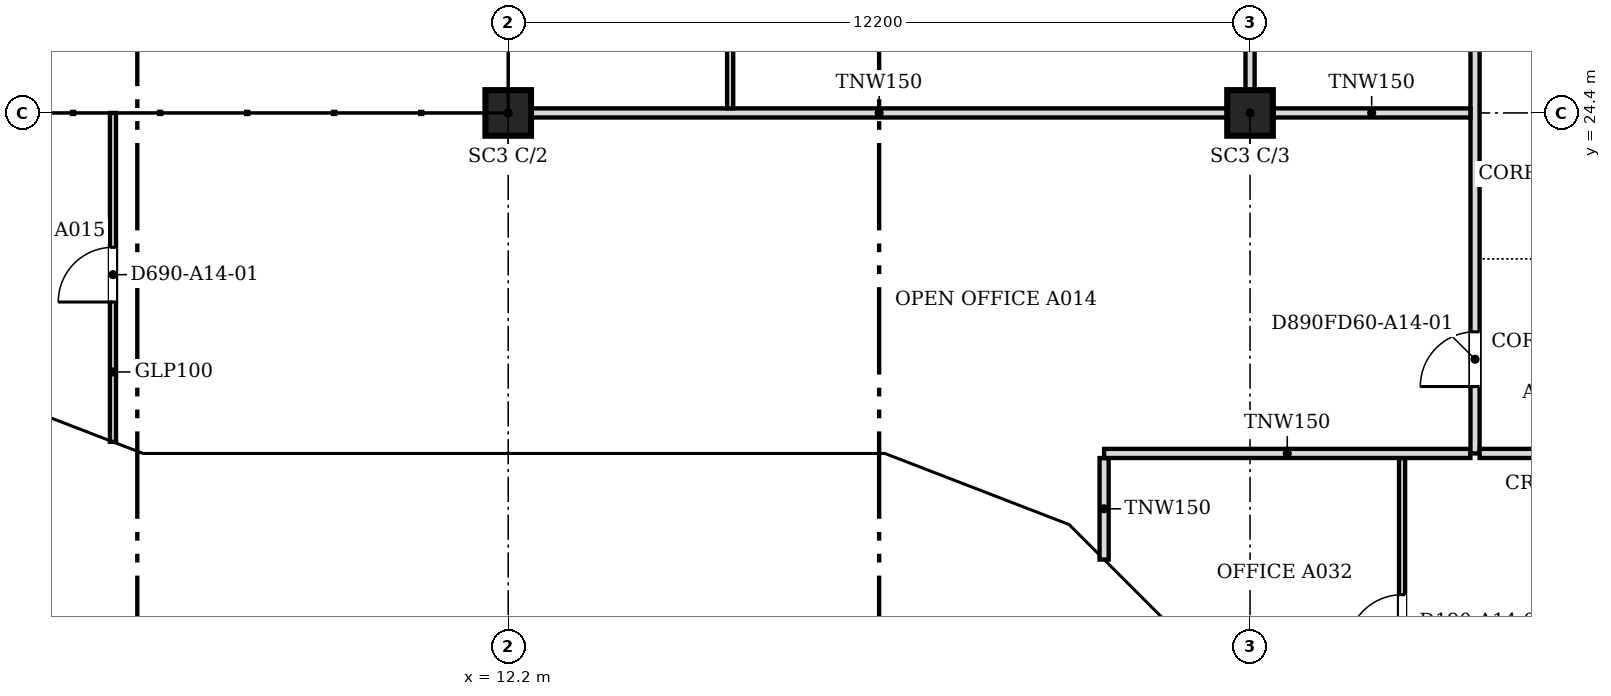
"""IFC4 building model, lengths in metres.
Left out: names, types, materials, properties, quantities, classifications, styles, units other than length and angle.
Written with IfcOpenShell. Run it as: python <this file> out.ifc"""

import sys

from ifc_helpers import new_model, si_unit, direction, frame, frame_2d, origin, origin_2d, place, context, subcontext, project, spatial, polyline, rectangle, outline, extrude, faceted_brep, source, transform, mapped, element, fill, save


model = new_model("IFC4")
c1 = context("Model", 3, precision=1e-05, world=origin(), true_north=direction((0.0, 1.0)))
c2 = subcontext(c1, "Body", "Model", "MODEL_VIEW")
j1 = project(units=[si_unit("LENGTHUNIT", "METRE"), si_unit("PLANEANGLEUNIT", "RADIAN")], contexts=[c1])
p1 = place(None, origin())
s1 = spatial("IfcSite", under=j1, at=p1, CompositionType="ELEMENT")
p2 = place(p1, origin())
s2 = spatial("IfcBuilding", under=s1, at=p2, CompositionType="ELEMENT")
p3 = place(p2, frame((0.0, 0.0, 159.2)))
s3 = spatial("IfcBuildingStorey", under=s2, at=p3, CompositionType="ELEMENT", Elevation=159.2)
for number, where, z_axis, x_axis in (
    (1, (12.2, 24.4, 0.0), (0.0, 0.0, 1.0), (1.0, 0.0, 0.0)),
    (2, (24.4, 24.4, 0.0), (0.0, 0.0, 1.0), (1.0, 0.0, 0.0)),
):
    element("IfcColumn", number, at=place(p3, frame(where, z_axis=z_axis, x_axis=x_axis)), inside=s3, PredefinedType="COLUMN", context=c2, shape_type="SweptSolid", body=[
        extrude(rectangle(XDim=0.75, YDim=0.75, at=origin_2d()), origin(), (0.0, 0.0, 1.0), 3.6),
    ])
m1 = source(origin(), c2, "Body", "Brep", [
    faceted_brep([(0.053, -0.25, 0.0), (3.003, -0.25, 3.8), (0.053, -0.25, 7.6), (0.0, -0.25, 7.532), (0.0, -0.25, 0.068), (0.106, 0.25, 7.532), (2.957, 0.25, 3.86), (2.957, 0.25, 3.74), (0.106, 0.25, 0.068), (3.003, 0.0, 3.8), (0.053, 0.0, 0.0), (0.053, 0.0, 7.6)], [[[0, 1, 2, 3, 4]], [[5, 6, 7, 8]], [[8, 7, 9, 1, 0, 10]], [[6, 5, 11, 2, 1, 9]], [[3, 2, 11]], [[10, 0, 4]], [[8, 10, 4, 3, 11, 5]], [[9, 7, 6]]]),
])
p4 = place(p3, frame((3.344, 19.631, -3.8), z_axis=(0.0, 0.0, 1.0), x_axis=(0.933007896601, -0.359855894603, 0.0)))
e3 = element("IfcWall", 3, at=p4, inside=s3, PredefinedType="SOLIDWALL", context=c2, shape_type="MappedRepresentation", body=[
    mapped(m1, transform((0.0, 0.0, 0.0), scale=1.0)),
])
m2 = source(origin(), c2, "Body", "SweptSolid", [
    extrude(outline(polyline([(0.253, 0.665), (2.687, 3.8), (0.253, 6.935), (0.253, 0.665)])), frame((0.0, 0.26, 0.0), z_axis=(0.0, -1.0, 0.0), x_axis=(1.0, 0.0, 0.0)), (0.0, 0.0, 1.0), 0.52),
])
p5 = place(p4, origin())
e4 = element("IfcOpeningElement", 4, at=p5, cuts=e3, PredefinedType="OPENING", context=c2, shape_type="MappedRepresentation", body=[
    mapped(m2, transform((0.0, 0.0, 0.0), scale=1.0)),
])
m3 = source(origin(), c2, "Body", "Brep", [
    faceted_brep([(3.003, -0.25, 0.0), (6.053, -0.25, 3.8), (3.003, -0.25, 7.6), (0.0, -0.25, 3.8), (0.047, 0.25, 3.859), (3.003, 0.25, 7.6), (6.053, 0.25, 3.8), (3.003, 0.25, 0.0), (0.047, 0.25, 3.741), (0.0, 0.0, 3.8)], [[[0, 1, 2, 3]], [[4, 5, 6, 7, 8]], [[7, 6, 1, 0]], [[6, 5, 2, 1]], [[5, 4, 9, 3, 2]], [[8, 7, 0, 3, 9]], [[8, 9, 4]]]),
])
p6 = place(p3, frame((6.146, 18.55, -3.8), z_axis=(0.0, 0.0, 1.0), x_axis=(1.0, 0.0, 0.0)))
e5 = element("IfcWall", 5, at=p6, inside=s3, PredefinedType="SOLIDWALL", context=c2, shape_type="MappedRepresentation", body=[
    mapped(m3, transform((0.0, 0.0, 0.0), scale=1.0)),
])
m4 = source(origin(), c2, "Body", "SweptSolid", [
    extrude(outline(polyline([(3.005, 0.401), (5.733, 3.8), (3.005, 7.199), (0.319, 3.8), (3.005, 0.401)])), frame((0.0, 0.26, 0.0), z_axis=(0.0, -1.0, 0.0), x_axis=(1.0, 0.0, 0.0)), (0.0, 0.0, 1.0), 0.52),
])
p7 = place(p6, origin())
e6 = element("IfcOpeningElement", 6, at=p7, cuts=e5, PredefinedType="OPENING", context=c2, shape_type="MappedRepresentation", body=[
    mapped(m4, transform((0.0, 0.0, 0.0), scale=1.0)),
])
m5 = source(origin(), c2, "Body", "Brep", [
    faceted_brep([(3.05, -0.25, 0.0), (6.1, -0.25, 3.743), (6.1, -0.25, 3.857), (3.05, -0.25, 7.6), (0.0, -0.25, 3.8), (0.0, 0.25, 3.8), (3.05, 0.25, 7.6), (6.146, 0.25, 3.8), (3.05, 0.25, 0.0), (6.146, -0.0, 3.8)], [[[0, 1, 2, 3, 4]], [[5, 6, 7, 8]], [[8, 7, 9, 1, 0]], [[7, 6, 3, 2, 9]], [[6, 5, 4, 3]], [[5, 8, 0, 4]], [[1, 9, 2]]]),
])
p8 = place(p3, frame((12.2, 18.55, -3.8), z_axis=(0.0, 0.0, 1.0), x_axis=(1.0, 0.0, 0.0)))
e7 = element("IfcWall", 7, at=p8, inside=s3, PredefinedType="SOLIDWALL", context=c2, shape_type="MappedRepresentation", body=[
    mapped(m5, transform((0.0, 0.0, 0.0), scale=1.0)),
])
m6 = source(origin(), c2, "Body", "SweptSolid", [
    extrude(outline(polyline([(3.052, 0.398), (5.824, 3.8), (3.052, 7.203), (0.321, 3.8), (3.052, 0.398)])), frame((0.0, 0.26, 0.0), z_axis=(0.0, -1.0, 0.0), x_axis=(1.0, 0.0, 0.0)), (0.0, 0.0, 1.0), 0.52),
])
p9 = place(p8, origin())
e8 = element("IfcOpeningElement", 8, at=p9, cuts=e7, PredefinedType="OPENING", context=c2, shape_type="MappedRepresentation", body=[
    mapped(m6, transform((0.0, 0.0, 0.0), scale=1.0)),
])
m7 = source(origin(), c2, "Body", "Brep", [
    faceted_brep([(3.096, -0.25, 7.536), (0.047, -0.25, 3.856), (0.047, -0.25, 3.744), (3.096, -0.25, 0.064), (0.0, 0.25, 3.8), (3.149, 0.25, 7.6), (3.202, 0.25, 7.536), (3.202, 0.25, 0.064), (3.149, 0.25, 0.0), (3.149, -0.0, 0.0), (3.149, -0.0, 7.6), (0.0, 0.0, 3.8)], [[[0, 1, 2, 3]], [[4, 5, 6, 7, 8]], [[8, 7, 9]], [[6, 5, 10]], [[5, 4, 11, 1, 0, 10]], [[4, 8, 9, 3, 2, 11]], [[11, 2, 1]], [[3, 9, 7, 6, 10, 0]]]),
])
p10 = place(p3, frame((18.346, 18.55, -3.8), z_axis=(0.0, 0.0, 1.0), x_axis=(0.932985567668, -0.359913782069, 0.0)))
e9 = element("IfcWall", 9, at=p10, inside=s3, PredefinedType="SOLIDWALL", context=c2, shape_type="MappedRepresentation", body=[
    mapped(m7, transform((0.0, 0.0, 0.0), scale=1.0)),
])
m8 = source(origin(), c2, "Body", "SweptSolid", [
    extrude(outline(polyline([(2.949, 6.967), (0.325, 3.8), (2.949, 0.633), (2.949, 6.967)])), frame((0.0, 0.26, 0.0), z_axis=(0.0, -1.0, 0.0), x_axis=(1.0, 0.0, 0.0)), (0.0, 0.0, 1.0), 0.52),
])
p11 = place(p10, origin())
e10 = element("IfcOpeningElement", 10, at=p11, cuts=e9, PredefinedType="OPENING", context=c2, shape_type="MappedRepresentation", body=[
    mapped(m8, transform((0.0, 0.0, 0.0), scale=1.0)),
])
m9 = source(origin(), c2, "Body", "Brep", [
    faceted_brep([(0.106, -0.25, 0.064), (3.156, -0.25, 3.736), (3.156, -0.25, 3.864), (0.106, -0.25, 7.536), (0.0, 0.25, 7.536), (0.053, 0.25, 7.6), (3.209, 0.25, 3.8), (0.053, 0.25, 0.0), (0.0, 0.25, 0.064), (3.209, -0.0, 3.8), (0.053, 0.0, 0.0), (0.053, 0.0, 7.6)], [[[0, 1, 2, 3]], [[4, 5, 6, 7, 8]], [[7, 6, 9, 1, 0, 10]], [[6, 5, 11, 3, 2, 9]], [[5, 4, 11]], [[8, 7, 10]], [[8, 10, 0, 3, 11, 4]], [[1, 9, 2]]]),
])
p12 = place(p3, frame((21.248, 17.454, -3.8), z_axis=(0.0, 0.0, 1.0), x_axis=(0.707106781187, -0.707106781187, 0.0)))
e11 = element("IfcWall", 11, at=p12, inside=s3, PredefinedType="SOLIDWALL", context=c2, shape_type="MappedRepresentation", body=[
    mapped(m9, transform((0.0, 0.0, 0.0), scale=1.0)),
])
m10 = source(origin(), c2, "Body", "SweptSolid", [
    extrude(outline(polyline([(0.253, 0.632), (2.884, 3.8), (0.253, 6.968), (0.253, 0.632)])), frame((0.0, 0.26, 0.0), z_axis=(0.0, -1.0, 0.0), x_axis=(1.0, 0.0, 0.0)), (0.0, 0.0, 1.0), 0.52),
])
p13 = place(p12, origin())
e12 = element("IfcOpeningElement", 12, at=p13, cuts=e11, PredefinedType="OPENING", context=c2, shape_type="MappedRepresentation", body=[
    mapped(m10, transform((0.0, 0.0, 0.0), scale=1.0)),
])
p14 = place(p2, frame((0.0, 0.0, 163.0)))
s4 = spatial("IfcBuildingStorey", under=s2, at=p14, CompositionType="ELEMENT", Elevation=163.0)
m11 = source(origin(), c2, "Body", "Brep", [
    faceted_brep([(2.95, -0.25, 0.0), (2.997, -0.25, 0.059), (2.997, -0.25, 7.541), (2.95, -0.25, 7.6), (0.0, -0.25, 3.8), (0.053, 0.25, 3.868), (2.904, 0.25, 7.54), (2.904, 0.25, 0.06), (0.053, 0.25, 3.732), (2.95, 0.0, 0.0), (2.95, 0.0, 7.6), (0.0, 0.0, 3.8)], [[[0, 1, 2, 3, 4]], [[5, 6, 7, 8]], [[1, 0, 9]], [[10, 3, 2]], [[6, 5, 11, 4, 3, 10]], [[8, 7, 9, 0, 4, 11]], [[8, 11, 5]], [[1, 9, 7, 6, 10, 2]]]),
])
p15 = place(p14, frame((3.394, 19.612, -3.8), z_axis=(0.0, 0.0, 1.0), x_axis=(0.932990326376, -0.359901446078, 0.0)))
e13 = element("IfcWall", 13, at=p15, inside=s4, PredefinedType="SOLIDWALL", context=c2, shape_type="MappedRepresentation", body=[
    mapped(m11, transform((0.0, 0.0, 0.0), scale=1.0)),
])
m12 = source(origin(), c2, "Body", "SweptSolid", [
    extrude(outline(polyline([(2.75, 6.935), (0.316, 3.8), (2.75, 0.665), (2.75, 6.935)])), frame((0.0, 0.26, 0.0), z_axis=(0.0, -1.0, 0.0), x_axis=(1.0, 0.0, 0.0)), (0.0, 0.0, 1.0), 0.52),
])
p16 = place(p15, origin())
e14 = element("IfcOpeningElement", 14, at=p16, cuts=e13, PredefinedType="OPENING", context=c2, shape_type="MappedRepresentation", body=[
    mapped(m12, transform((0.0, 0.0, 0.0), scale=1.0)),
])
m13 = source(origin(), c2, "Body", "Brep", [
    faceted_brep([(0.047, -0.25, 0.0), (3.05, -0.25, 3.8), (0.047, -0.25, 7.6), (0.0, -0.25, 7.54), (0.0, -0.25, 0.06), (0.093, 0.25, 7.541), (3.05, 0.25, 3.8), (0.093, 0.25, 0.059), (0.047, 0.0, 0.0), (0.047, 0.0, 7.6)], [[[0, 1, 2, 3, 4]], [[5, 6, 7]], [[7, 6, 1, 0, 8]], [[6, 5, 9, 2, 1]], [[3, 2, 9]], [[8, 0, 4]], [[7, 8, 4, 3, 9, 5]]]),
])
p17 = place(p14, frame((6.1, 18.55, -3.8), z_axis=(0.0, 0.0, 1.0), x_axis=(1.0, 0.0, 0.0)))
e15 = element("IfcWall", 15, at=p17, inside=s4, PredefinedType="SOLIDWALL", context=c2, shape_type="MappedRepresentation", body=[
    mapped(m13, transform((0.0, 0.0, 0.0), scale=1.0)),
])
m14 = source(origin(), c2, "Body", "SweptSolid", [
    extrude(outline(polyline([(0.247, 0.656), (2.731, 3.8), (0.247, 6.944), (0.247, 0.656)])), frame((0.0, 0.26, 0.0), z_axis=(0.0, -1.0, 0.0), x_axis=(1.0, 0.0, 0.0)), (0.0, 0.0, 1.0), 0.52),
])
p18 = place(p17, origin())
e16 = element("IfcOpeningElement", 16, at=p18, cuts=e15, PredefinedType="OPENING", context=c2, shape_type="MappedRepresentation", body=[
    mapped(m14, transform((0.0, 0.0, 0.0), scale=1.0)),
])
m15 = source(origin(), c2, "Body", "SweptSolid", [
    extrude(outline(polyline([(3.05, 0.0), (6.1, 3.8), (3.05, 7.6), (0.0, 3.8), (3.05, 0.0)])), frame((0.0, 0.25, 0.0), z_axis=(0.0, -1.0, 0.0), x_axis=(1.0, 0.0, 0.0)), (0.0, 0.0, 1.0), 0.5),
])
p19 = place(p14, frame((9.15, 18.55, -3.8), z_axis=(0.0, 0.0, 1.0), x_axis=(1.0, 0.0, 0.0)))
e17 = element("IfcWall", 17, at=p19, inside=s4, PredefinedType="SOLIDWALL", context=c2, shape_type="MappedRepresentation", body=[
    mapped(m15, transform((0.0, 0.0, 0.0), scale=1.0)),
])
m16 = source(origin(), c2, "Body", "SweptSolid", [
    extrude(outline(polyline([(3.05, 0.399), (5.78, 3.8), (3.05, 7.201), (0.321, 3.8), (3.05, 0.399)])), frame((0.0, 0.26, 0.0), z_axis=(0.0, -1.0, 0.0), x_axis=(1.0, 0.0, 0.0)), (0.0, 0.0, 1.0), 0.52),
])
p20 = place(p19, origin())
e18 = element("IfcOpeningElement", 18, at=p20, cuts=e17, PredefinedType="OPENING", context=c2, shape_type="MappedRepresentation", body=[
    mapped(m16, transform((0.0, 0.0, 0.0), scale=1.0)),
])
m17 = source(origin(), c2, "Body", "Brep", [
    faceted_brep([(3.05, -0.25, 7.543), (0.0, -0.25, 3.8), (3.05, -0.25, 0.057), (0.0, 0.25, 3.8), (3.096, 0.25, 7.6), (3.143, 0.25, 7.544), (3.143, 0.25, 0.056), (3.096, 0.25, 0.0), (3.096, -0.0, 0.0), (3.096, -0.0, 7.6)], [[[0, 1, 2]], [[3, 4, 5, 6, 7]], [[7, 6, 8]], [[5, 4, 9]], [[4, 3, 1, 0, 9]], [[3, 7, 8, 2, 1]], [[2, 8, 6, 5, 9, 0]]]),
])
p21 = place(p14, frame((15.25, 18.55, -3.8), z_axis=(0.0, 0.0, 1.0), x_axis=(1.0, 0.0, 0.0)))
e19 = element("IfcWall", 19, at=p21, inside=s4, PredefinedType="SOLIDWALL", context=c2, shape_type="MappedRepresentation", body=[
    mapped(m17, transform((0.0, 0.0, 0.0), scale=1.0)),
])
m18 = source(origin(), c2, "Body", "SweptSolid", [
    extrude(outline(polyline([(2.896, 6.959), (0.323, 3.8), (2.896, 0.641), (2.896, 6.959)])), frame((0.0, 0.26, 0.0), z_axis=(0.0, -1.0, 0.0), x_axis=(1.0, 0.0, 0.0)), (0.0, 0.0, 1.0), 0.52),
])
p22 = place(p21, origin())
e20 = element("IfcOpeningElement", 20, at=p22, cuts=e19, PredefinedType="OPENING", context=c2, shape_type="MappedRepresentation", body=[
    mapped(m18, transform((0.0, 0.0, 0.0), scale=1.0)),
])
m19 = source(origin(), c2, "Body", "Brep", [
    faceted_brep([(0.093, -0.25, 0.056), (3.143, -0.25, 3.736), (3.143, -0.25, 3.864), (0.093, -0.25, 7.544), (0.0, 0.25, 7.543), (0.047, 0.25, 7.6), (3.196, 0.25, 3.8), (0.047, 0.25, 0.0), (0.0, 0.25, 0.057), (3.196, -0.0, 3.8), (0.047, 0.0, 0.0), (0.047, 0.0, 7.6)], [[[0, 1, 2, 3]], [[4, 5, 6, 7, 8]], [[7, 6, 9, 1, 0, 10]], [[6, 5, 11, 3, 2, 9]], [[5, 4, 11]], [[8, 7, 10]], [[8, 10, 0, 3, 11, 4]], [[1, 9, 2]]]),
])
p23 = place(p14, frame((18.303, 18.567, -3.8), z_axis=(0.0, 0.0, 1.0), x_axis=(0.932978940178, -0.359930961693, 0.0)))
e21 = element("IfcWall", 21, at=p23, inside=s4, PredefinedType="SOLIDWALL", context=c2, shape_type="MappedRepresentation", body=[
    mapped(m19, transform((0.0, 0.0, 0.0), scale=1.0)),
])
m20 = source(origin(), c2, "Body", "SweptSolid", [
    extrude(outline(polyline([(0.247, 0.633), (2.871, 3.8), (0.247, 6.967), (0.247, 0.633)])), frame((0.0, 0.26, 0.0), z_axis=(0.0, -1.0, 0.0), x_axis=(1.0, 0.0, 0.0)), (0.0, 0.0, 1.0), 0.52),
])
p24 = place(p23, origin())
e22 = element("IfcOpeningElement", 22, at=p24, cuts=e21, PredefinedType="OPENING", context=c2, shape_type="MappedRepresentation", body=[
    mapped(m20, transform((0.0, 0.0, 0.0), scale=1.0)),
])
m21 = source(origin(), c2, "Body", "Brep", [
    faceted_brep([(3.103, -0.25, 7.536), (0.053, -0.25, 3.864), (0.053, -0.25, 3.736), (3.103, -0.25, 0.064), (0.0, 0.25, 3.8), (3.156, 0.25, 7.6), (3.209, 0.25, 7.536), (3.209, 0.25, 0.064), (3.156, 0.25, 0.0), (3.156, -0.0, 0.0), (3.156, -0.0, 7.6), (0.0, 0.0, 3.8)], [[[0, 1, 2, 3]], [[4, 5, 6, 7, 8]], [[8, 7, 9]], [[6, 5, 10]], [[5, 4, 11, 1, 0, 10]], [[4, 8, 9, 3, 2, 11]], [[11, 2, 1]], [[3, 9, 7, 6, 10, 0]]]),
])
p25 = place(p14, frame((21.285, 17.417, -3.8), z_axis=(0.0, 0.0, 1.0), x_axis=(0.707106781187, -0.707106781187, 0.0)))
e23 = element("IfcWall", 23, at=p25, inside=s4, PredefinedType="SOLIDWALL", context=c2, shape_type="MappedRepresentation", body=[
    mapped(m21, transform((0.0, 0.0, 0.0), scale=1.0)),
])
m22 = source(origin(), c2, "Body", "SweptSolid", [
    extrude(outline(polyline([(2.956, 6.968), (0.325, 3.8), (2.956, 0.632), (2.956, 6.968)])), frame((0.0, 0.26, 0.0), z_axis=(0.0, -1.0, 0.0), x_axis=(1.0, 0.0, 0.0)), (0.0, 0.0, 1.0), 0.52),
])
p26 = place(p25, origin())
e24 = element("IfcOpeningElement", 24, at=p26, cuts=e23, PredefinedType="OPENING", context=c2, shape_type="MappedRepresentation", body=[
    mapped(m22, transform((0.0, 0.0, 0.0), scale=1.0)),
])
p27 = place(p3, frame((26.9, 13.276, 0.0), z_axis=(0.0, 0.0, 1.0), x_axis=(0.0, 1.0, 0.0)))
e25 = element("IfcWall", 25, at=p27, inside=s3, PredefinedType="PARTITIONING", context=c2, shape_type="SweptSolid", body=[
    extrude(rectangle(XDim=5.448, YDim=0.1, at=frame_2d((2.724, 0.0))), origin(), (0.0, 0.0, 1.0), 3.067),
])
m23 = source(origin(), c2, "Body", "SweptSolid", [
    extrude(rectangle(XDim=0.9, YDim=2.1, at=frame_2d((0.45, 1.05))), frame((0.0, 0.06, 0.0), z_axis=(0.0, -1.0, 0.0), x_axis=(1.0, 0.0, 0.0)), (0.0, 0.0, 1.0), 0.12),
])
p28 = place(p27, frame((2.3, 0.0, 0.0)))
e26 = element("IfcOpeningElement", 26, at=p28, cuts=e25, PredefinedType="OPENING", context=c2, shape_type="MappedRepresentation", body=[
    mapped(m23, transform((0.0, 0.0, 0.0), scale=1.0)),
])
p29 = place(p3, frame((22.0, 17.055, 0.0), z_axis=(0.0, 0.0, 1.0), x_axis=(0.0, 1.0, 0.0)))
e27 = element("IfcWall", 27, at=p29, inside=s3, PredefinedType="PARTITIONING", context=c2, shape_type="SweptSolid", body=[
    extrude(rectangle(XDim=1.669, YDim=0.15, at=frame_2d((0.834, 0.0))), origin(), (0.0, 0.0, 1.0), 3.067),
])
p30 = place(p3, frame((22.0, 18.8, 0.0), z_axis=(0.0, 0.0, 1.0), x_axis=(1.0, 0.0, 0.0)))
e28 = element("IfcWall", 28, at=p30, inside=s3, PredefinedType="PARTITIONING", context=c2, shape_type="SweptSolid", body=[
    extrude(rectangle(XDim=6.024, YDim=0.15, at=frame_2d((3.012, 0.0))), origin(), (0.0, 0.0, 1.0), 3.067),
])
p31 = place(p3, frame((28.1, 18.8, 0.0), z_axis=(0.0, 0.0, 1.0), x_axis=(0.0, 1.0, 0.0)))
e29 = element("IfcWall", 29, at=p31, inside=s3, PredefinedType="PARTITIONING", context=c2, shape_type="SweptSolid", body=[
    extrude(rectangle(XDim=26.5, YDim=0.15, at=frame_2d((13.25, 0.0))), origin(), (0.0, 0.0, 1.0), 3.067),
])
m24 = source(origin(), c2, "Body", "SweptSolid", [
    extrude(rectangle(XDim=0.9, YDim=2.1, at=frame_2d((0.45, 1.05))), frame((0.0, 0.085, 0.0), z_axis=(0.0, -1.0, 0.0), x_axis=(1.0, 0.0, 0.0)), (0.0, 0.0, 1.0), 0.17),
])
p32 = place(p31, frame((1.1, 0.0, 0.0)))
e30 = element("IfcOpeningElement", 30, at=p32, cuts=e29, PredefinedType="OPENING", context=c2, shape_type="MappedRepresentation", body=[
    mapped(m24, transform((0.0, 0.0, 0.0), scale=1.0)),
])
m25 = source(origin(), c2, "Body", "SweptSolid", [
    extrude(rectangle(XDim=1.0, YDim=2.1, at=frame_2d((0.5, 1.05))), frame((0.0, 0.085, 0.0), z_axis=(0.0, -1.0, 0.0), x_axis=(1.0, 0.0, 0.0)), (0.0, 0.0, 1.0), 0.17),
])
p33 = place(p31, frame((23.151, 0.0, 0.0)))
e31 = element("IfcOpeningElement", 31, at=p33, cuts=e29, PredefinedType="OPENING", context=c2, shape_type="MappedRepresentation", body=[
    mapped(m25, transform((0.0, 0.0, 0.0), scale=1.0)),
])
p34 = place(p31, frame((8.1, 0.0, 0.0)))
e32 = element("IfcOpeningElement", 32, at=p34, cuts=e29, PredefinedType="OPENING", context=c2, shape_type="MappedRepresentation", body=[
    mapped(m25, transform((0.0, 0.0, 0.0), scale=1.0)),
])
p35 = place(p31, frame((15.8, 0.0, 0.0)))
e33 = element("IfcOpeningElement", 33, at=p35, cuts=e29, PredefinedType="OPENING", context=c2, shape_type="MappedRepresentation", body=[
    mapped(m24, transform((0.0, 0.0, 0.0), scale=1.0)),
])
p36 = place(p3, frame((28.176, 18.8, 0.0), z_axis=(0.0, 0.0, 1.0), x_axis=(1.0, 0.0, 0.0)))
e34 = element("IfcWall", 34, at=p36, inside=s3, PredefinedType="PARTITIONING", context=c2, shape_type="SweptSolid", body=[
    extrude(rectangle(XDim=2.248, YDim=0.15, at=frame_2d((1.124, 0.0))), origin(), (0.0, 0.0, 1.0), 3.067),
])
p37 = place(p3, frame((5.7, 18.99, 0.0), z_axis=(0.0, 0.0, 1.0), x_axis=(0.0, 1.0, 0.0)))
e35 = element("IfcWall", 35, at=p37, inside=s3, PredefinedType="PARTITIONING", context=c2, shape_type="SweptSolid", body=[
    extrude(rectangle(XDim=5.41, YDim=0.1, at=frame_2d((2.705, 0.0))), origin(), (0.0, 0.0, 1.0), 3.067),
])
p38 = place(p37, frame((2.3, 0.0, 0.0)))
e36 = element("IfcOpeningElement", 36, at=p38, cuts=e35, PredefinedType="OPENING", context=c2, shape_type="MappedRepresentation", body=[
    mapped(m23, transform((0.0, 0.0, 0.0), scale=1.0)),
])
p39 = place(p3, frame((12.576, 24.4, 0.0), z_axis=(0.0, 0.0, 1.0), x_axis=(1.0, 0.0, 0.0)))
e37 = element("IfcWall", 37, at=p39, inside=s3, PredefinedType="PARTITIONING", context=c2, shape_type="SweptSolid", body=[
    extrude(rectangle(XDim=11.448, YDim=0.15, at=frame_2d((5.724, 0.0))), origin(), (0.0, 0.0, 1.0), 3.067),
])
p40 = place(p3, frame((24.776, 24.4, 0.0), z_axis=(0.0, 0.0, 1.0), x_axis=(1.0, 0.0, 0.0)))
e38 = element("IfcWall", 38, at=p40, inside=s3, PredefinedType="PARTITIONING", context=c2, shape_type="SweptSolid", body=[
    extrude(rectangle(XDim=3.248, YDim=0.15, at=frame_2d((1.624, 0.0))), origin(), (0.0, 0.0, 1.0), 3.067),
])
p41 = place(p3, frame((15.85, 24.476, 0.0), z_axis=(0.0, 0.0, 1.0), x_axis=(0.0, 1.0, 0.0)))
e39 = element("IfcWall", 39, at=p41, inside=s3, PredefinedType="PARTITIONING", context=c2, shape_type="SweptSolid", body=[
    extrude(rectangle(XDim=5.948, YDim=0.1, at=frame_2d((2.974, 0.0))), origin(), (0.0, 0.0, 1.0), 3.067),
])
p42 = place(p41, frame((2.5, 0.0, 0.0)))
e40 = element("IfcOpeningElement", 40, at=p42, cuts=e39, PredefinedType="OPENING", context=c2, shape_type="MappedRepresentation", body=[
    mapped(m23, transform((0.0, 0.0, 0.0), scale=1.0)),
])
p43 = place(p3, frame((24.4, 24.776, 0.0), z_axis=(0.0, 0.0, 1.0), x_axis=(0.0, 1.0, 0.0)))
e41 = element("IfcWall", 41, at=p43, inside=s3, PredefinedType="PARTITIONING", context=c2, shape_type="SweptSolid", body=[
    extrude(rectangle(XDim=5.648, YDim=0.15, at=frame_2d((2.824, 0.0))), origin(), (0.0, 0.0, 1.0), 3.067),
])
p44 = place(p43, frame((2.4, 0.0, 0.0)))
e42 = element("IfcOpeningElement", 42, at=p44, cuts=e41, PredefinedType="OPENING", context=c2, shape_type="MappedRepresentation", body=[
    mapped(m24, transform((0.0, 0.0, 0.0), scale=1.0)),
])
m26 = source(origin(), c2, "Body", "SweptSolid", [
    extrude(rectangle(XDim=0.9, YDim=2.1, at=frame_2d((0.45, 1.05))), frame((0.0, 0.025, 0.0), z_axis=(0.0, -1.0, 0.0), x_axis=(1.0, 0.0, 0.0)), (0.0, 0.0, 1.0), 0.05),
])
p45 = place(p32, origin())
e43 = element("IfcDoor", 43, at=p45, inside=s3, OperationType="SINGLE_SWING_LEFT", PredefinedType="DOOR", context=c2, shape_type="MappedRepresentation", body=[
    mapped(m26, transform((0.0, 0.0, 0.0), scale=1.0)),
])
fill(e30, e43)
p46 = place(p38, origin())
e44 = element("IfcDoor", 44, at=p46, inside=s3, OperationType="SINGLE_SWING_LEFT", PredefinedType="DOOR", context=c2, shape_type="MappedRepresentation", body=[
    mapped(m26, transform((0.0, 0.0, 0.0), scale=1.0)),
])
fill(e36, e44)
p47 = place(p28, origin())
e45 = element("IfcDoor", 45, at=p47, inside=s3, OperationType="SINGLE_SWING_LEFT", PredefinedType="DOOR", context=c2, shape_type="MappedRepresentation", body=[
    mapped(m26, transform((0.0, 0.0, 0.0), scale=1.0)),
])
fill(e26, e45)
save(model, sys.argv[1])
